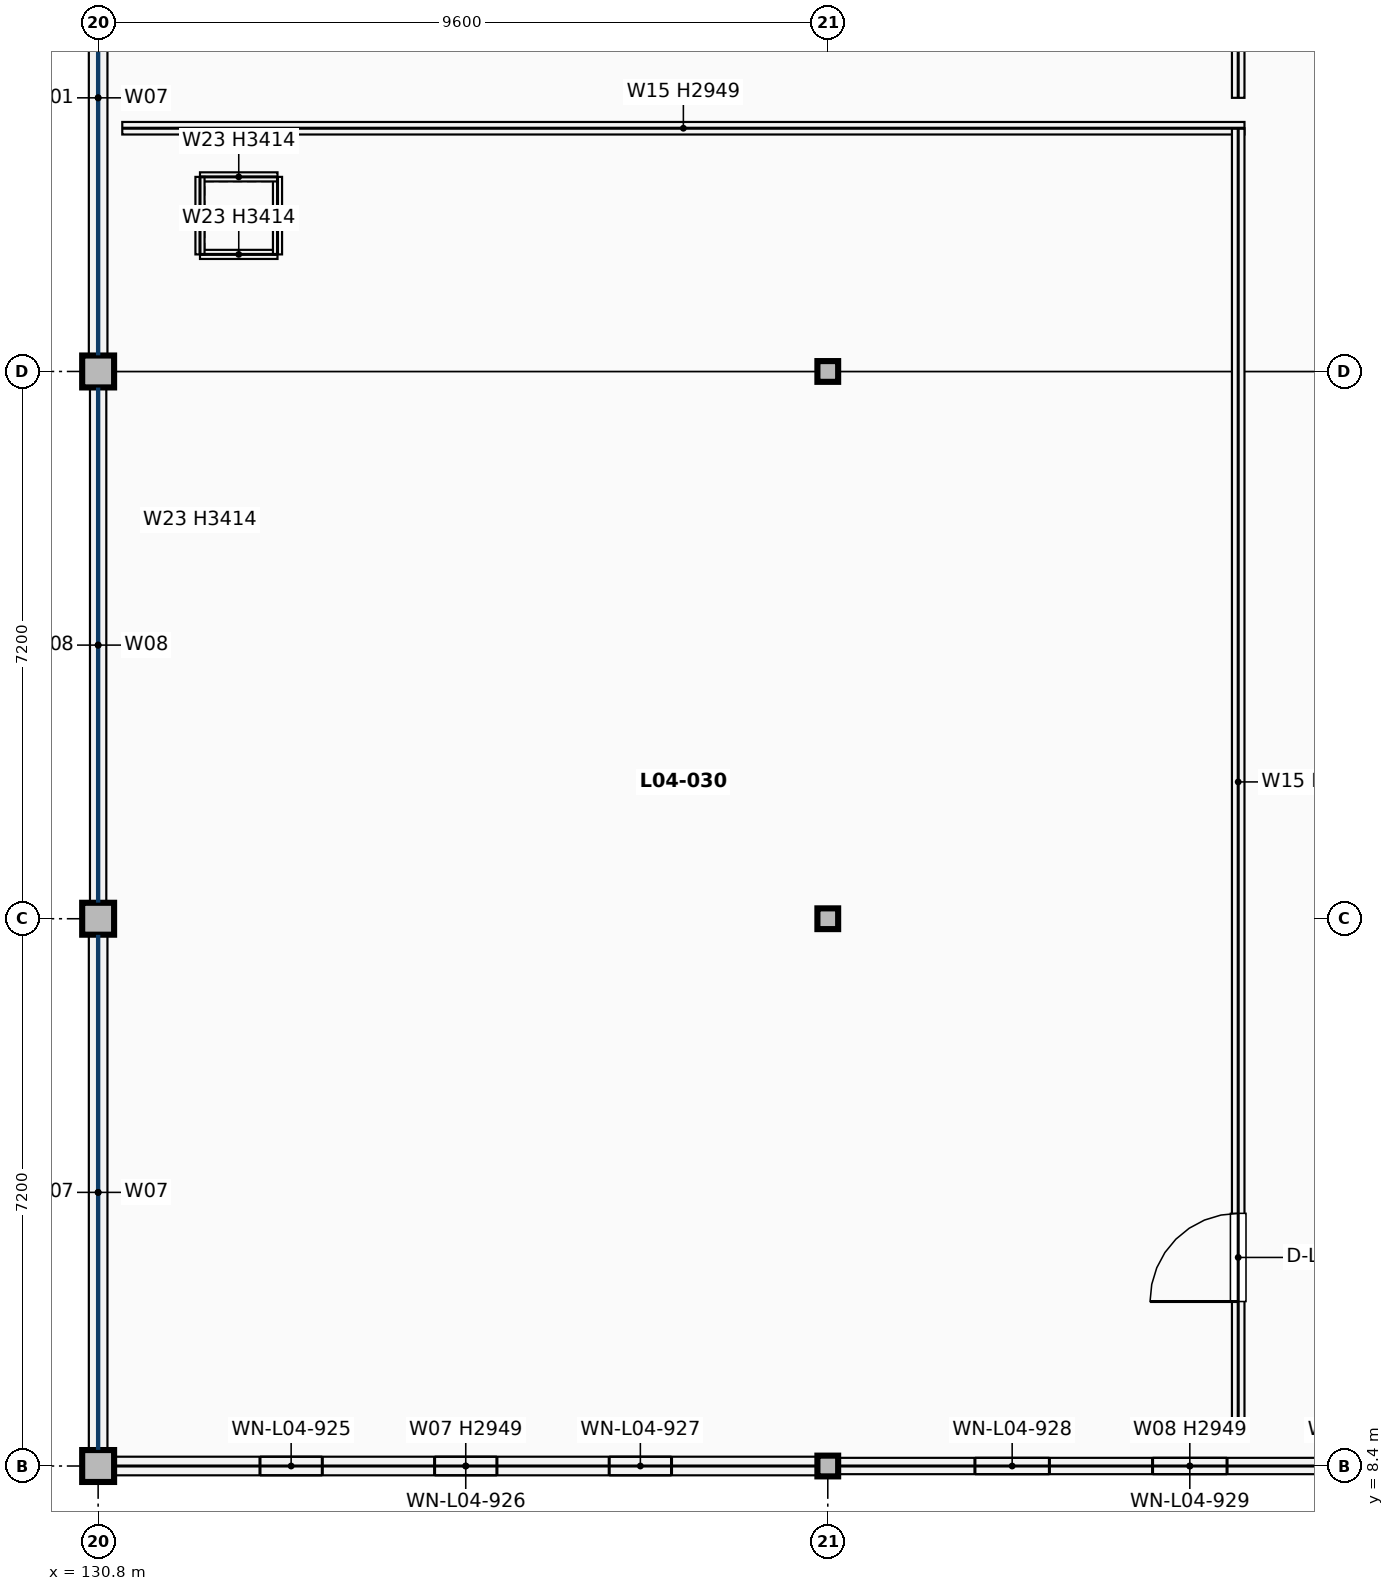
"""IFC4 building model, lengths in metres.
Left out: names, types, materials, properties, quantities, classifications, styles, units other than length and angle.
Written with IfcOpenShell. Run it as: python <this file> out.ifc"""

import sys

from ifc_helpers import new_model, si_unit, direction, frame, frame_2d, origin, origin_2d, place, context, subcontext, project, spatial, rectangle, hollow_circle, extrude, element, fill, save


model = new_model("IFC4")
c1 = context("Model", 3, precision=1e-05, world=origin(), true_north=direction((0.0, 1.0)))
c2 = subcontext(c1, "Body", "Model", "MODEL_VIEW")
j1 = project(units=[si_unit("LENGTHUNIT", "METRE"), si_unit("PLANEANGLEUNIT", "RADIAN")], contexts=[c1])
p1 = place(None, origin())
s1 = spatial("IfcSite", under=j1, at=p1, CompositionType="ELEMENT")
p2 = place(p1, origin())
s2 = spatial("IfcBuilding", under=s1, at=p2, CompositionType="ELEMENT")
p3 = place(p2, frame((0.0, 0.0, 17.34)))
s3 = spatial("IfcBuildingStorey", under=s2, at=p3, CompositionType="ELEMENT", Elevation=17.34)
for number, where, z_axis, x_axis in (
    (1, (130.8, 8.4, 0.0), (0.0, 0.0, 1.0), (1.0, 0.0, 0.0)),
    (2, (130.8, 15.6, 0.0), (0.0, 0.0, 1.0), (1.0, 0.0, 0.0)),
    (3, (130.8, 22.8, 0.0), (0.0, 0.0, 1.0), (1.0, 0.0, 0.0)),
):
    element("IfcColumn", number, at=place(p3, frame(where, z_axis=z_axis, x_axis=x_axis)), inside=s3, PredefinedType="COLUMN", context=c2, shape_type="SweptSolid", body=[
        extrude(rectangle(XDim=0.42, YDim=0.42, at=origin_2d()), origin(), (0.0, 0.0, 1.0), 3.74),
    ])
for number, where, z_axis, x_axis in (
    (4, (140.4, 8.4, 0.0), (0.0, 0.0, 1.0), (1.0, 0.0, 0.0)),
    (5, (140.4, 15.6, 0.0), (0.0, 0.0, 1.0), (1.0, 0.0, 0.0)),
    (6, (140.4, 22.8, 0.0), (0.0, 0.0, 1.0), (1.0, 0.0, 0.0)),
):
    element("IfcColumn", number, at=place(p3, frame(where, z_axis=z_axis, x_axis=x_axis)), inside=s3, PredefinedType="COLUMN", context=c2, shape_type="SweptSolid", body=[
        extrude(hollow_circle(Radius=0.136, WallThickness=0.012, at=origin_2d()), origin(), (0.0, 0.0, 1.0), 3.7),
    ])
p4 = place(p3, frame((131.012, 8.4, 0.0), z_axis=(0.0, 0.0, 1.0), x_axis=(1.0, 0.0, 0.0)))
e7 = element("IfcWall", 7, at=p4, inside=s3, PredefinedType="SOLIDWALL", context=c2, shape_type="SweptSolid", body=[
    extrude(rectangle(XDim=9.25, YDim=0.245, at=frame_2d((4.625, 0.0))), origin(), (0.0, 0.0, 1.0), 2.949),
])
p5 = place(p4, frame((1.917, 0.0, 0.75)))
e8 = element("IfcOpeningElement", 8, at=p5, cuts=e7, PredefinedType="OPENING", context=c2, shape_type="SweptSolid", body=[
    extrude(rectangle(XDim=0.82, YDim=2.02, at=frame_2d((0.41, 1.01))), frame((0.0, 0.133, 0.0), z_axis=(0.0, -1.0, 0.0), x_axis=(1.0, 0.0, 0.0)), (0.0, 0.0, 1.0), 0.265),
])
p6 = place(p4, frame((4.215, 0.0, 0.75)))
e9 = element("IfcOpeningElement", 9, at=p6, cuts=e7, PredefinedType="OPENING", context=c2, shape_type="SweptSolid", body=[
    extrude(rectangle(XDim=0.82, YDim=2.02, at=frame_2d((0.41, 1.01))), frame((0.0, 0.133, 0.0), z_axis=(0.0, -1.0, 0.0), x_axis=(1.0, 0.0, 0.0)), (0.0, 0.0, 1.0), 0.265),
])
p7 = place(p4, frame((6.512, 0.0, 0.75)))
e10 = element("IfcOpeningElement", 10, at=p7, cuts=e7, PredefinedType="OPENING", context=c2, shape_type="SweptSolid", body=[
    extrude(rectangle(XDim=0.82, YDim=2.02, at=frame_2d((0.41, 1.01))), frame((0.0, 0.133, 0.0), z_axis=(0.0, -1.0, 0.0), x_axis=(1.0, 0.0, 0.0)), (0.0, 0.0, 1.0), 0.265),
])
p8 = place(p3, frame((140.539, 8.4, 0.0), z_axis=(0.0, 0.0, 1.0), x_axis=(1.0, 0.0, 0.0)))
e11 = element("IfcWall", 11, at=p8, inside=s3, PredefinedType="SOLIDWALL", context=c2, shape_type="SweptSolid", body=[
    extrude(rectangle(XDim=9.25, YDim=0.215, at=frame_2d((4.625, 0.0))), origin(), (0.0, 0.0, 1.0), 2.949),
])
p9 = place(p8, frame((1.797, 0.0, 0.75)))
e12 = element("IfcOpeningElement", 12, at=p9, cuts=e11, PredefinedType="OPENING", context=c2, shape_type="SweptSolid", body=[
    extrude(rectangle(XDim=0.98, YDim=2.08, at=frame_2d((0.49, 1.04))), frame((0.0, 0.118, 0.0), z_axis=(0.0, -1.0, 0.0), x_axis=(1.0, 0.0, 0.0)), (0.0, 0.0, 1.0), 0.235),
])
p10 = place(p8, frame((4.135, 0.0, 0.75)))
e13 = element("IfcOpeningElement", 13, at=p10, cuts=e11, PredefinedType="OPENING", context=c2, shape_type="SweptSolid", body=[
    extrude(rectangle(XDim=0.98, YDim=2.08, at=frame_2d((0.49, 1.04))), frame((0.0, 0.118, 0.0), z_axis=(0.0, -1.0, 0.0), x_axis=(1.0, 0.0, 0.0)), (0.0, 0.0, 1.0), 0.235),
])
p11 = place(p8, frame((6.472, 0.0, 0.75)))
e14 = element("IfcOpeningElement", 14, at=p11, cuts=e11, PredefinedType="OPENING", context=c2, shape_type="SweptSolid", body=[
    extrude(rectangle(XDim=0.98, YDim=2.08, at=frame_2d((0.49, 1.04))), frame((0.0, 0.118, 0.0), z_axis=(0.0, -1.0, 0.0), x_axis=(1.0, 0.0, 0.0)), (0.0, 0.0, 1.0), 0.235),
])
p12 = place(p3, frame((130.8, 8.612, 0.0), z_axis=(0.0, 0.0, 1.0), x_axis=(0.0, 1.0, 0.0)))
e15 = element("IfcWall", 15, at=p12, inside=s3, PredefinedType="SOLIDWALL", context=c2, shape_type="SweptSolid", body=[
    extrude(rectangle(XDim=6.776, YDim=0.245, at=frame_2d((3.388, 0.0))), origin(), (0.0, 0.0, 1.0), 0.85),
])
p13 = place(p3, frame((130.8, 15.812, 0.0), z_axis=(0.0, 0.0, 1.0), x_axis=(0.0, 1.0, 0.0)))
e16 = element("IfcWall", 16, at=p13, inside=s3, PredefinedType="SOLIDWALL", context=c2, shape_type="SweptSolid", body=[
    extrude(rectangle(XDim=6.776, YDim=0.215, at=frame_2d((3.388, 0.0))), origin(), (0.0, 0.0, 1.0), 0.85),
])
p14 = place(p3, frame((130.8, 23.012, 0.0), z_axis=(0.0, 0.0, 1.0), x_axis=(0.0, 1.0, 0.0)))
e17 = element("IfcWall", 17, at=p14, inside=s3, PredefinedType="SOLIDWALL", context=c2, shape_type="SweptSolid", body=[
    extrude(rectangle(XDim=6.776, YDim=0.245, at=frame_2d((3.388, 0.0))), origin(), (0.0, 0.0, 1.0), 0.85),
])
for number, where, z_axis, x_axis in (
    (18, (132.14, 24.34, 0.0), (0.0, 0.0, 1.0), (1.0, 0.0, 0.0)),
    (19, (133.16, 24.34, 0.0), (0.0, 0.0, 1.0), (0.0, 1.0, 0.0)),
    (20, (133.16, 25.36, 0.0), (0.0, 0.0, 1.0), (-1.0, 0.0, 0.0)),
    (21, (132.14, 25.36, 0.0), (0.0, 0.0, 1.0), (0.0, -1.0, 0.0)),
):
    element("IfcWall", number, at=place(p3, frame(where, z_axis=z_axis, x_axis=x_axis)), inside=s3, PredefinedType="PARTITIONING", context=c2, shape_type="SweptSolid", body=[
        extrude(rectangle(XDim=1.02, YDim=0.12, at=frame_2d((0.51, 0.0))), origin(), (0.0, 0.0, 1.0), 3.414),
    ])
p15 = place(p3, frame((131.117, 26.0, 0.0), z_axis=(0.0, 0.0, 1.0), x_axis=(1.0, 0.0, 0.0)))
e22 = element("IfcWall", 22, at=p15, inside=s3, PredefinedType="PARTITIONING", context=c2, shape_type="SweptSolid", body=[
    extrude(rectangle(XDim=14.765, YDim=0.165, at=frame_2d((7.383, 0.0))), origin(), (0.0, 0.0, 1.0), 2.949),
])
p16 = place(p3, frame((145.8, 8.8, 0.0), z_axis=(0.0, 0.0, 1.0), x_axis=(0.0, 1.0, 0.0)))
e23 = element("IfcWall", 23, at=p16, inside=s3, PredefinedType="PARTITIONING", context=c2, shape_type="SweptSolid", body=[
    extrude(rectangle(XDim=17.2, YDim=0.165, at=frame_2d((8.6, 0.0))), origin(), (0.0, 0.0, 1.0), 3.029),
])
p17 = place(p16, frame((1.764, 0.0, 0.0)))
e24 = element("IfcOpeningElement", 24, at=p17, cuts=e23, PredefinedType="OPENING", context=c2, shape_type="SweptSolid", body=[
    extrude(rectangle(XDim=1.16, YDim=2.22, at=frame_2d((0.58, 1.11))), frame((0.0, 0.093, 0.0), z_axis=(0.0, -1.0, 0.0), x_axis=(1.0, 0.0, 0.0)), (0.0, 0.0, 1.0), 0.185),
])
p18 = place(p3, frame((145.8, 26.4, 0.0), z_axis=(0.0, 0.0, 1.0), x_axis=(0.0, 1.0, 0.0)))
e25 = element("IfcWall", 25, at=p18, inside=s3, PredefinedType="PARTITIONING", context=c2, shape_type="SweptSolid", body=[
    extrude(rectangle(XDim=17.6, YDim=0.165, at=frame_2d((8.8, 0.0))), origin(), (0.0, 0.0, 1.0), 3.029),
])
p19 = place(p18, frame((14.636, 0.0, 0.0)))
e26 = element("IfcOpeningElement", 26, at=p19, cuts=e25, PredefinedType="OPENING", context=c2, shape_type="SweptSolid", body=[
    extrude(rectangle(XDim=1.16, YDim=2.22, at=frame_2d((0.58, 1.11))), frame((0.0, 0.093, 0.0), z_axis=(0.0, -1.0, 0.0), x_axis=(1.0, 0.0, 0.0)), (0.0, 0.0, 1.0), 0.185),
])
p20 = place(p5, origin())
e27 = element("IfcWindow", 27, at=p20, inside=s3, PartitioningType="SINGLE_PANEL", PredefinedType="WINDOW", context=c2, shape_type="SweptSolid", body=[
    extrude(rectangle(XDim=0.82, YDim=2.02, at=frame_2d((0.41, 1.01))), frame((0.0, 0.03, 0.0), z_axis=(0.0, -1.0, 0.0), x_axis=(1.0, 0.0, 0.0)), (0.0, 0.0, 1.0), 0.06),
])
fill(e8, e27)
p21 = place(p6, origin())
e28 = element("IfcWindow", 28, at=p21, inside=s3, PartitioningType="SINGLE_PANEL", PredefinedType="WINDOW", context=c2, shape_type="SweptSolid", body=[
    extrude(rectangle(XDim=0.82, YDim=2.02, at=frame_2d((0.41, 1.01))), frame((0.0, 0.03, 0.0), z_axis=(0.0, -1.0, 0.0), x_axis=(1.0, 0.0, 0.0)), (0.0, 0.0, 1.0), 0.06),
])
fill(e9, e28)
p22 = place(p7, origin())
e29 = element("IfcWindow", 29, at=p22, inside=s3, PartitioningType="SINGLE_PANEL", PredefinedType="WINDOW", context=c2, shape_type="SweptSolid", body=[
    extrude(rectangle(XDim=0.82, YDim=2.02, at=frame_2d((0.41, 1.01))), frame((0.0, 0.03, 0.0), z_axis=(0.0, -1.0, 0.0), x_axis=(1.0, 0.0, 0.0)), (0.0, 0.0, 1.0), 0.06),
])
fill(e10, e29)
p23 = place(p9, origin())
e30 = element("IfcWindow", 30, at=p23, inside=s3, PartitioningType="SINGLE_PANEL", PredefinedType="WINDOW", context=c2, shape_type="SweptSolid", body=[
    extrude(rectangle(XDim=0.98, YDim=2.08, at=frame_2d((0.49, 1.04))), frame((0.0, 0.03, 0.0), z_axis=(0.0, -1.0, 0.0), x_axis=(1.0, 0.0, 0.0)), (0.0, 0.0, 1.0), 0.06),
])
fill(e12, e30)
p24 = place(p10, origin())
e31 = element("IfcWindow", 31, at=p24, inside=s3, PartitioningType="SINGLE_PANEL", PredefinedType="WINDOW", context=c2, shape_type="SweptSolid", body=[
    extrude(rectangle(XDim=0.98, YDim=2.08, at=frame_2d((0.49, 1.04))), frame((0.0, 0.03, 0.0), z_axis=(0.0, -1.0, 0.0), x_axis=(1.0, 0.0, 0.0)), (0.0, 0.0, 1.0), 0.06),
])
fill(e13, e31)
p25 = place(p17, origin())
e32 = element("IfcDoor", 32, at=p25, inside=s3, OperationType="SINGLE_SWING_LEFT", PredefinedType="DOOR", context=c2, shape_type="SweptSolid", body=[
    extrude(rectangle(XDim=1.16, YDim=2.22, at=frame_2d((0.58, 1.11))), frame((0.0, 0.025, 0.0), z_axis=(0.0, -1.0, 0.0), x_axis=(1.0, 0.0, 0.0)), (0.0, 0.0, 1.0), 0.05),
])
fill(e24, e32)
save(model, sys.argv[1])
